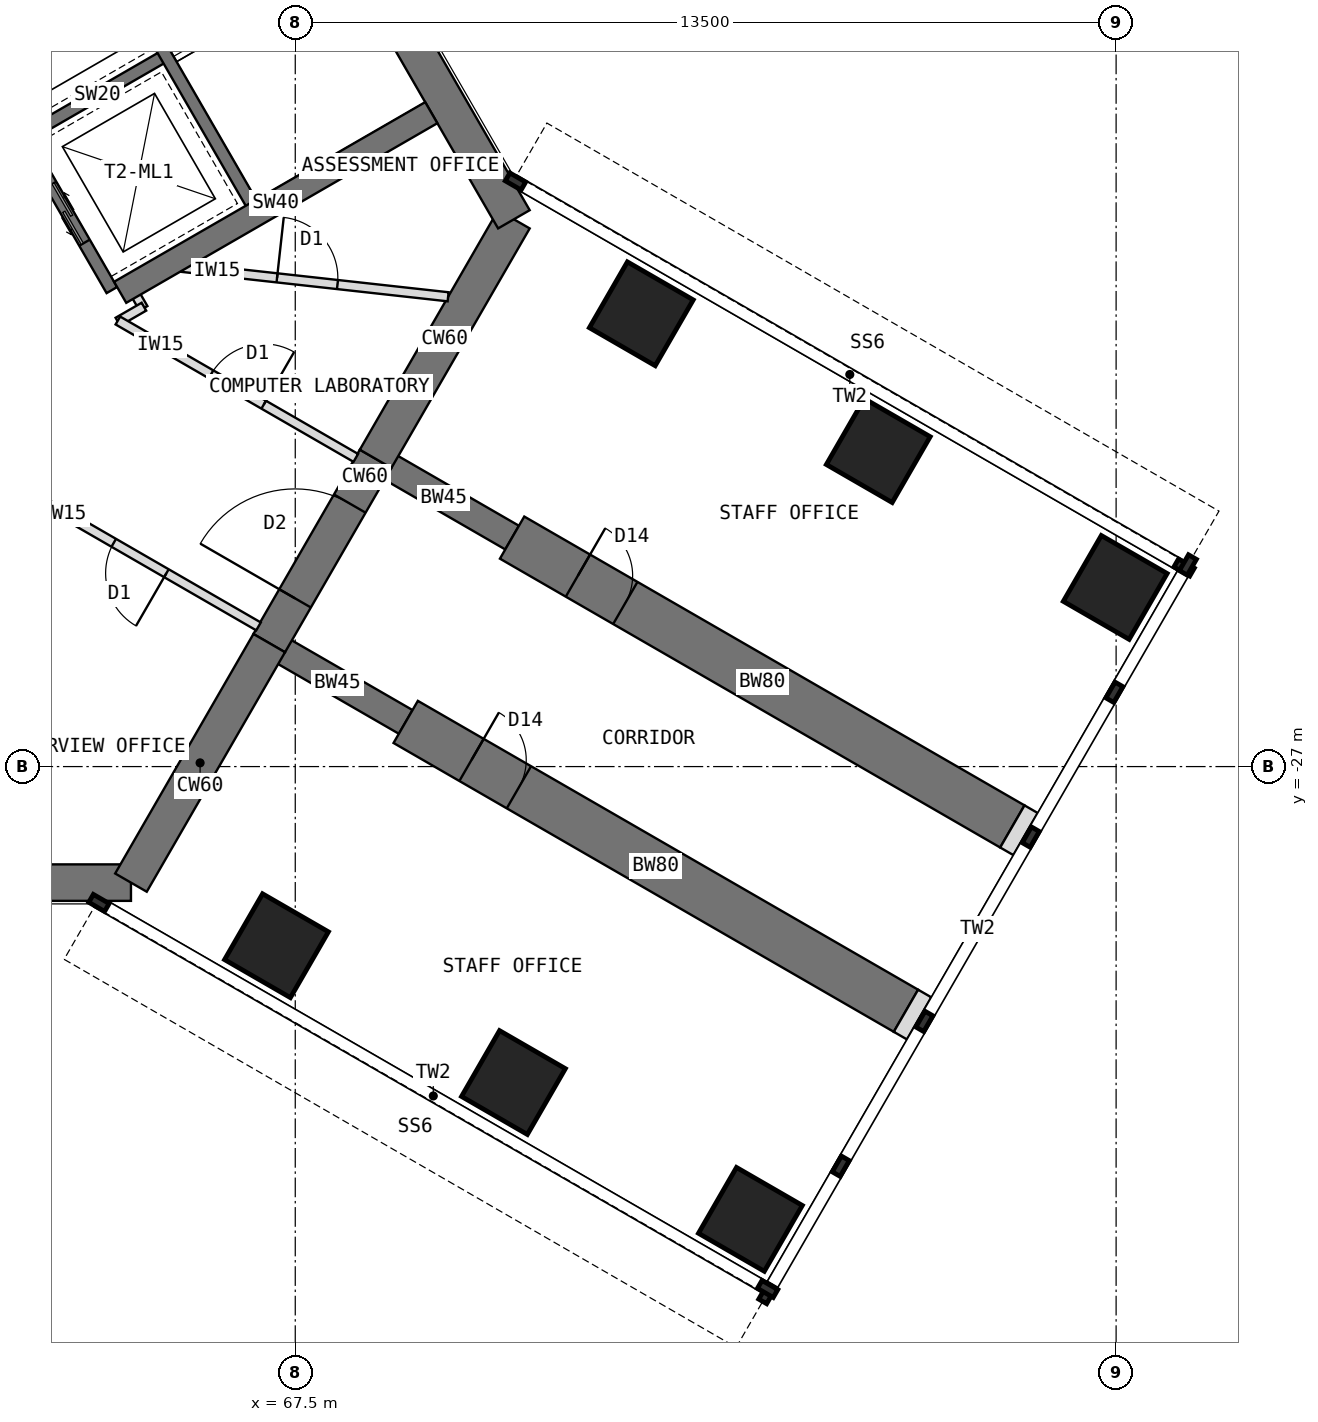
"""IFC4 building model, lengths in metres.
Left out: names, types, materials, properties, quantities, classifications, styles, units other than length and angle.
Written with IfcOpenShell. Run it as: python <this file> out.ifc"""

import sys

from ifc_helpers import new_model, si_unit, direction, frame, frame_2d, origin, origin_2d, place, context, subcontext, project, spatial, rectangle, extrude, element, fill, save


model = new_model("IFC4")
c1 = context("Model", 3, precision=1e-05, world=origin(), true_north=direction((0.0, 1.0)))
c2 = subcontext(c1, "Body", "Model", "MODEL_VIEW")
j1 = project(units=[si_unit("LENGTHUNIT", "METRE"), si_unit("PLANEANGLEUNIT", "RADIAN")], contexts=[c1])
p1 = place(None, origin())
s1 = spatial("IfcSite", under=j1, at=p1, CompositionType="ELEMENT")
p2 = place(p1, origin())
s2 = spatial("IfcBuilding", under=s1, at=p2, CompositionType="ELEMENT")
p3 = place(p2, frame((0.0, 0.0, 145.5)))
s3 = spatial("IfcBuildingStorey", under=s2, at=p3, CompositionType="ELEMENT", Elevation=145.5)
p4 = place(p3, frame((52.202, -28.908, 0.0), z_axis=(0.0, 0.0, 1.0), x_axis=(1.0, 0.0, 0.0)))
e1 = element("IfcWall", 1, at=p4, inside=s3, PredefinedType="SHEAR", context=c2, shape_type="SweptSolid", body=[
    extrude(rectangle(XDim=12.596, YDim=0.6, at=frame_2d((6.298, 0.0))), origin(), (0.0, 0.0, 1.0), 4.0),
])
p5 = place(p3, frame((64.798, -28.908, 0.0), z_axis=(0.0, 0.0, 1.0), x_axis=(0.499984222037, 0.866034513004, 0.0)))
e2 = element("IfcWall", 2, at=p5, inside=s3, PredefinedType="SHEAR", context=c2, shape_type="SweptSolid", body=[
    extrude(rectangle(XDim=4.548, YDim=0.6, at=frame_2d((2.274, 0.0))), origin(), (0.0, 0.0, 1.0), 4.0),
])
p6 = place(p3, frame((67.072, -24.97, 0.0), z_axis=(0.0, 0.0, 1.0), x_axis=(0.500010275428, 0.866019471182, 0.0)))
e3 = element("IfcWall", 3, at=p6, inside=s3, PredefinedType="SHEAR", context=c2, shape_type="SweptSolid", body=[
    extrude(rectangle(XDim=3.5, YDim=0.6, at=frame_2d((1.75, 0.0))), origin(), (0.0, 0.0, 1.0), 4.0),
])
p7 = place(p6, frame((0.85, 0.0, 0.0)))
e4 = element("IfcOpeningElement", 4, at=p7, cuts=e3, PredefinedType="OPENING", context=c2, shape_type="SweptSolid", body=[
    extrude(rectangle(XDim=1.8, YDim=2.1, at=frame_2d((0.9, 1.05))), frame((0.0, 0.31, 0.0), z_axis=(0.0, -1.0, 0.0), x_axis=(1.0, 0.0, 0.0)), (0.0, 0.0, 1.0), 0.62),
])
p8 = place(p3, frame((68.822, -21.939, 0.0), z_axis=(0.0, 0.0, 1.0), x_axis=(0.500024481964, 0.866011268655, 0.0)))
e5 = element("IfcWall", 5, at=p8, inside=s3, PredefinedType="SHEAR", context=c2, shape_type="SweptSolid", body=[
    extrude(rectangle(XDim=4.548, YDim=0.6, at=frame_2d((2.274, 0.0))), origin(), (0.0, 0.0, 1.0), 4.0),
])
p9 = place(p3, frame((71.096, -18.0, 0.0), z_axis=(0.0, 0.0, 1.0), x_axis=(-0.500005998175, 0.866021940709, 0.0)))
e6 = element("IfcWall", 6, at=p9, inside=s3, PredefinedType="SHEAR", context=c2, shape_type="SweptSolid", body=[
    extrude(rectangle(XDim=12.596, YDim=0.6, at=frame_2d((6.298, 0.0))), origin(), (0.0, 0.0, 1.0), 4.0),
])
p10 = place(p3, frame((68.822, -21.939, 0.0), z_axis=(0.0, 0.0, 1.0), x_axis=(0.866072649678, -0.499918158782, 0.0)))
e7 = element("IfcWall", 7, at=p10, inside=s3, PredefinedType="SHEAR", context=c2, shape_type="SweptSolid", body=[
    extrude(rectangle(XDim=2.592, YDim=0.45, at=frame_2d((1.296, 0.0))), origin(), (0.0, 0.0, 1.0), 4.0),
])
p11 = place(p3, frame((71.066, -23.234, 0.0), z_axis=(0.0, 0.0, 1.0), x_axis=(0.86602681393, -0.499997557548, 0.0)))
e8 = element("IfcWall", 8, at=p11, inside=s3, PredefinedType="SHEAR", context=c2, shape_type="SweptSolid", body=[
    extrude(rectangle(XDim=9.5, YDim=0.8, at=frame_2d((4.75, 0.0))), origin(), (0.0, 0.0, 1.0), 4.0),
])
p12 = place(p11, frame((1.25, 0.0, 0.0)))
e9 = element("IfcOpeningElement", 9, at=p12, cuts=e8, PredefinedType="OPENING", context=c2, shape_type="SweptSolid", body=[
    extrude(rectangle(XDim=0.9, YDim=2.1, at=frame_2d((0.45, 1.05))), frame((0.0, 0.41, 0.0), z_axis=(0.0, -1.0, 0.0), x_axis=(1.0, 0.0, 0.0)), (0.0, 0.0, 1.0), 0.82),
])
p13 = place(p3, frame((67.072, -24.97, 0.0), z_axis=(0.0, 0.0, 1.0), x_axis=(0.866031863473, -0.499988811324, 0.0)))
e10 = element("IfcWall", 10, at=p13, inside=s3, PredefinedType="SHEAR", context=c2, shape_type="SweptSolid", body=[
    extrude(rectangle(XDim=2.592, YDim=0.45, at=frame_2d((1.296, 0.0))), origin(), (0.0, 0.0, 1.0), 4.0),
])
p14 = place(p3, frame((69.316, -26.266, 0.0), z_axis=(0.0, 0.0, 1.0), x_axis=(0.86602681393, -0.499997557548, 0.0)))
e11 = element("IfcWall", 11, at=p14, inside=s3, PredefinedType="SHEAR", context=c2, shape_type="SweptSolid", body=[
    extrude(rectangle(XDim=9.5, YDim=0.8, at=frame_2d((4.75, 0.0))), origin(), (0.0, 0.0, 1.0), 4.0),
])
p15 = place(p14, frame((1.25, 0.0, 0.0)))
e12 = element("IfcOpeningElement", 12, at=p15, cuts=e11, PredefinedType="OPENING", context=c2, shape_type="SweptSolid", body=[
    extrude(rectangle(XDim=0.9, YDim=2.1, at=frame_2d((0.45, 1.05))), frame((0.0, 0.41, 0.0), z_axis=(0.0, -1.0, 0.0), x_axis=(1.0, 0.0, 0.0)), (0.0, 0.0, 1.0), 0.82),
])
for number, where, z_axis, x_axis in (
    (13, (73.191, -19.554, 0.0), (0.0, 0.0, 1.0), (0.5, 0.866, 0.0)),
    (14, (67.191, -29.946, 0.0), (0.0, 0.0, 1.0), (0.5, 0.866, 0.0)),
    (15, (77.088, -21.804, 0.0), (0.0, 0.0, 1.0), (0.5, 0.866, 0.0)),
    (16, (71.088, -32.196, 0.0), (0.0, 0.0, 1.0), (0.5, 0.866, 0.0)),
    (17, (80.986, -24.054, 0.0), (0.0, 0.0, 1.0), (0.5, 0.866, 0.0)),
    (18, (74.986, -34.446, 0.0), (0.0, 0.0, 1.0), (0.5, 0.866, 0.0)),
):
    element("IfcColumn", number, at=place(p3, frame(where, z_axis=z_axis, x_axis=x_axis)), inside=s3, PredefinedType="COLUMN", context=c2, shape_type="SweptSolid", body=[
        extrude(rectangle(XDim=1.25, YDim=1.25, at=origin_2d()), origin(), (0.0, 0.0, 1.0), 4.0),
    ])
for number, where, z_axis, x_axis in (
    (19, (79.294, -27.984, 0.0), (0.0, 0.0, 1.0), (0.866, -0.5, 0.0)),
    (20, (77.544, -31.016, 0.0), (0.0, 0.0, 1.0), (0.866, -0.5, 0.0)),
):
    element("IfcWall", number, at=place(p3, frame(where, z_axis=z_axis, x_axis=x_axis)), inside=s3, PredefinedType="PARTITIONING", context=c2, shape_type="SweptSolid", body=[
        extrude(rectangle(XDim=0.25, YDim=0.8, at=frame_2d((0.125, 0.0))), origin(), (0.0, 0.0, 1.0), 3.8),
    ])
p16 = place(p3, frame((64.484, -19.164, 0.0), z_axis=(0.0, 0.0, 1.0), x_axis=(-0.49999894854, 0.866026010844, 0.0)))
e21 = element("IfcWall", 21, at=p16, inside=s3, PredefinedType="SHEAR", context=c2, shape_type="SweptSolid", body=[
    extrude(rectangle(XDim=8.0, YDim=0.2, at=frame_2d((4.0, 0.0))), origin(), (0.0, 0.0, 1.0), 4.0),
])
p17 = place(p16, frame((6.3, 0.0, 0.0)))
e22 = element("IfcOpeningElement", 22, at=p17, cuts=e21, PredefinedType="OPENING", context=c2, shape_type="SweptSolid", body=[
    extrude(rectangle(XDim=1.2, YDim=2.1, at=frame_2d((0.6, 1.05))), frame((0.0, 0.11, 0.0), z_axis=(0.0, -1.0, 0.0), x_axis=(1.0, 0.0, 0.0)), (0.0, 0.0, 1.0), 0.22),
])
p18 = place(p16, frame((0.9, 0.0, 0.0)))
e23 = element("IfcOpeningElement", 23, at=p18, cuts=e21, PredefinedType="OPENING", context=c2, shape_type="SweptSolid", body=[
    extrude(rectangle(XDim=1.1, YDim=2.2, at=frame_2d((0.55, 1.1))), frame((0.0, 0.11, 0.0), z_axis=(0.0, -1.0, 0.0), x_axis=(1.0, 0.0, 0.0)), (0.0, 0.0, 1.0), 0.22),
])
p19 = place(p16, frame((3.8, 0.0, 0.0)))
e24 = element("IfcOpeningElement", 24, at=p19, cuts=e21, PredefinedType="OPENING", context=c2, shape_type="SweptSolid", body=[
    extrude(rectangle(XDim=1.1, YDim=2.2, at=frame_2d((0.55, 1.1))), frame((0.0, 0.11, 0.0), z_axis=(0.0, -1.0, 0.0), x_axis=(1.0, 0.0, 0.0)), (0.0, 0.0, 1.0), 0.22),
])
p20 = place(p3, frame((63.12, -16.603, 0.0), z_axis=(0.0, 0.0, 1.0), x_axis=(0.866062058628, 0.499936506574, 0.0)))
e25 = element("IfcWall", 25, at=p20, inside=s3, PredefinedType="SHEAR", context=c2, shape_type="SweptSolid", body=[
    extrude(rectangle(XDim=2.6, YDim=0.2, at=frame_2d((1.3, 0.0))), origin(), (0.0, 0.0, 1.0), 4.0),
])
p21 = place(p3, frame((66.822, -17.814, 0.0), z_axis=(0.0, 0.0, 1.0), x_axis=(-0.49999894854, 0.866026010844, 0.0)))
e26 = element("IfcWall", 26, at=p21, inside=s3, PredefinedType="SHEAR", context=c2, shape_type="SweptSolid", body=[
    extrude(rectangle(XDim=8.0, YDim=0.2, at=frame_2d((4.0, 0.0))), origin(), (0.0, 0.0, 1.0), 4.0),
])
p22 = place(p21, frame((6.7, 0.0, 0.0)))
e27 = element("IfcOpeningElement", 27, at=p22, cuts=e26, PredefinedType="OPENING", context=c2, shape_type="SweptSolid", body=[
    extrude(rectangle(XDim=1.1, YDim=2.1, at=frame_2d((0.55, 1.05))), frame((0.0, 0.11, 0.0), z_axis=(0.0, -1.0, 0.0), x_axis=(1.0, 0.0, 0.0)), (0.0, 0.0, 1.0), 0.22),
])
p23 = place(p3, frame((64.62, -19.201, 0.0), z_axis=(0.0, 0.0, 1.0), x_axis=(0.866027317282, 0.49999668571, 0.0)))
e28 = element("IfcWall", 28, at=p23, inside=s3, PredefinedType="SHEAR", context=c2, shape_type="SweptSolid", body=[
    extrude(rectangle(XDim=5.908, YDim=0.4, at=frame_2d((2.954, 0.0))), origin(), (0.0, 0.0, 1.0), 4.0),
])
p24 = place(p3, frame((64.789, -19.092, 0.0), z_axis=(0.0, 0.0, 1.0), x_axis=(0.499804398801, -0.866138304741, 0.0)))
e29 = element("IfcWall", 29, at=p24, inside=s3, PredefinedType="PARTITIONING", context=c2, shape_type="SweptSolid", body=[
    extrude(rectangle(XDim=0.43, YDim=0.15, at=frame_2d((0.215, 0.0))), origin(), (0.0, 0.0, 1.0), 3.8),
])
p25 = place(p3, frame((65.011, -19.437, 0.0), z_axis=(0.0, 0.0, 1.0), x_axis=(-0.865831790172, -0.50033519877, 0.0)))
e30 = element("IfcWall", 30, at=p25, inside=s3, PredefinedType="PARTITIONING", context=c2, shape_type="SweptSolid", body=[
    extrude(rectangle(XDim=0.494, YDim=0.15, at=frame_2d((0.247, 0.0))), origin(), (0.0, 0.0, 1.0), 3.8),
])
p26 = place(p3, frame((64.583, -19.664, 0.0), z_axis=(0.0, 0.0, 1.0), x_axis=(0.866006515865, -0.500032713409, 0.0)))
e31 = element("IfcWall", 31, at=p26, inside=s3, PredefinedType="PARTITIONING", context=c2, shape_type="SweptSolid", body=[
    extrude(rectangle(XDim=4.518, YDim=0.15, at=frame_2d((2.259, 0.0))), origin(), (0.0, 0.0, 1.0), 3.8),
])
p27 = place(p26, frame((1.769, 0.0, 0.0)))
e32 = element("IfcOpeningElement", 32, at=p27, cuts=e31, PredefinedType="OPENING", context=c2, shape_type="SweptSolid", body=[
    extrude(rectangle(XDim=1.0, YDim=2.1, at=frame_2d((0.5, 1.05))), frame((0.0, 0.085, 0.0), z_axis=(0.0, -1.0, 0.0), x_axis=(1.0, 0.0, 0.0)), (0.0, 0.0, 1.0), 0.17),
])
p28 = place(p3, frame((66.896, -24.695, 0.0), z_axis=(0.0, 0.0, 1.0), x_axis=(-0.86602002524, 0.500009315796, 0.0)))
e33 = element("IfcWall", 33, at=p28, inside=s3, PredefinedType="PARTITIONING", context=c2, shape_type="SweptSolid", body=[
    extrude(rectangle(XDim=4.519, YDim=0.15, at=frame_2d((2.259, 0.0))), origin(), (0.0, 0.0, 1.0), 3.8),
])
p29 = place(p28, frame((1.749, 0.0, 0.0)))
e34 = element("IfcOpeningElement", 34, at=p29, cuts=e33, PredefinedType="OPENING", context=c2, shape_type="SweptSolid", body=[
    extrude(rectangle(XDim=1.0, YDim=2.1, at=frame_2d((0.5, 1.05))), frame((0.0, 0.085, 0.0), z_axis=(0.0, -1.0, 0.0), x_axis=(1.0, 0.0, 0.0)), (0.0, 0.0, 1.0), 0.17),
])
p30 = place(p3, frame((65.381, -18.761, 0.0), z_axis=(0.0, 0.0, 1.0), x_axis=(0.993932184458, -0.109994603044, 0.0)))
e35 = element("IfcWall", 35, at=p30, inside=s3, PredefinedType="PARTITIONING", context=c2, shape_type="SweptSolid", body=[
    extrude(rectangle(XDim=4.661, YDim=0.15, at=frame_2d((2.331, 0.0))), origin(), (0.0, 0.0, 1.0), 3.8),
])
p31 = place(p30, frame((1.831, 0.0, 0.0)))
e36 = element("IfcOpeningElement", 36, at=p31, cuts=e35, PredefinedType="OPENING", context=c2, shape_type="SweptSolid", body=[
    extrude(rectangle(XDim=1.0, YDim=2.1, at=frame_2d((0.5, 1.05))), frame((0.0, 0.085, 0.0), z_axis=(0.0, -1.0, 0.0), x_axis=(1.0, 0.0, 0.0)), (0.0, 0.0, 1.0), 0.17),
])
p32 = place(p18, origin())
e37 = element("IfcDoor", 37, at=p32, inside=s3, OperationType="DOUBLE_DOOR_SLIDING", PredefinedType="DOOR", context=c2, shape_type="SweptSolid", body=[
    extrude(rectangle(XDim=1.1, YDim=2.2, at=frame_2d((0.55, 1.1))), frame((0.0, 0.025, 0.0), z_axis=(0.0, -1.0, 0.0), x_axis=(1.0, 0.0, 0.0)), (0.0, 0.0, 1.0), 0.05),
])
fill(e23, e37)
p33 = place(p7, origin())
e38 = element("IfcDoor", 38, at=p33, inside=s3, OperationType="DOUBLE_DOOR_DOUBLE_SWING", PredefinedType="DOOR", context=c2, shape_type="SweptSolid", body=[
    extrude(rectangle(XDim=1.72, YDim=2.06, at=frame_2d((0.9, 1.03))), frame((0.0, 0.025, 0.0), z_axis=(0.0, -1.0, 0.0), x_axis=(1.0, 0.0, 0.0)), (0.0, 0.0, 1.0), 0.05),
    extrude(rectangle(XDim=0.04, YDim=2.1, at=frame_2d((0.02, 1.05))), frame((0.0, 0.3, 0.0), z_axis=(0.0, -1.0, 0.0), x_axis=(1.0, 0.0, 0.0)), (0.0, 0.0, 1.0), 0.6),
    extrude(rectangle(XDim=0.04, YDim=2.1, at=frame_2d((1.78, 1.05))), frame((0.0, 0.3, 0.0), z_axis=(0.0, -1.0, 0.0), x_axis=(1.0, 0.0, 0.0)), (0.0, 0.0, 1.0), 0.6),
    extrude(rectangle(XDim=1.72, YDim=0.04, at=frame_2d((0.9, 2.08))), frame((0.0, 0.3, 0.0), z_axis=(0.0, -1.0, 0.0), x_axis=(1.0, 0.0, 0.0)), (0.0, 0.0, 1.0), 0.6),
])
fill(e4, e38)
p34 = place(p29, origin())
e39 = element("IfcDoor", 39, at=p34, inside=s3, OperationType="SINGLE_SWING_LEFT", PredefinedType="DOOR", context=c2, shape_type="SweptSolid", body=[
    extrude(rectangle(XDim=1.0, YDim=2.1, at=frame_2d((0.5, 1.05))), frame((0.0, 0.025, 0.0), z_axis=(0.0, -1.0, 0.0), x_axis=(1.0, 0.0, 0.0)), (0.0, 0.0, 1.0), 0.05),
])
fill(e34, e39)
p35 = place(p27, origin())
e40 = element("IfcDoor", 40, at=p35, inside=s3, OperationType="SINGLE_SWING_RIGHT", PredefinedType="DOOR", context=c2, shape_type="SweptSolid", body=[
    extrude(rectangle(XDim=1.0, YDim=2.1, at=frame_2d((0.5, 1.05))), frame((0.0, 0.025, 0.0), z_axis=(0.0, -1.0, 0.0), x_axis=(1.0, 0.0, 0.0)), (0.0, 0.0, 1.0), 0.05),
])
fill(e32, e40)
p36 = place(p31, origin())
e41 = element("IfcDoor", 41, at=p36, inside=s3, OperationType="SINGLE_SWING_LEFT", PredefinedType="DOOR", context=c2, shape_type="SweptSolid", body=[
    extrude(rectangle(XDim=1.0, YDim=2.1, at=frame_2d((0.5, 1.05))), frame((0.0, 0.025, 0.0), z_axis=(0.0, -1.0, 0.0), x_axis=(1.0, 0.0, 0.0)), (0.0, 0.0, 1.0), 0.05),
])
fill(e36, e41)
p37 = place(p12, origin())
e42 = element("IfcDoor", 42, at=p37, inside=s3, OperationType="SINGLE_SWING_LEFT", PredefinedType="DOOR", context=c2, shape_type="SweptSolid", body=[
    extrude(rectangle(XDim=0.82, YDim=2.06, at=frame_2d((0.45, 1.03))), frame((0.0, 0.025, 0.0), z_axis=(0.0, -1.0, 0.0), x_axis=(1.0, 0.0, 0.0)), (0.0, 0.0, 1.0), 0.05),
    extrude(rectangle(XDim=0.04, YDim=2.1, at=frame_2d((0.02, 1.05))), frame((0.0, 0.4, 0.0), z_axis=(0.0, -1.0, 0.0), x_axis=(1.0, 0.0, 0.0)), (0.0, 0.0, 1.0), 0.8),
    extrude(rectangle(XDim=0.04, YDim=2.1, at=frame_2d((0.88, 1.05))), frame((0.0, 0.4, 0.0), z_axis=(0.0, -1.0, 0.0), x_axis=(1.0, 0.0, 0.0)), (0.0, 0.0, 1.0), 0.8),
    extrude(rectangle(XDim=0.82, YDim=0.04, at=frame_2d((0.45, 2.08))), frame((0.0, 0.4, 0.0), z_axis=(0.0, -1.0, 0.0), x_axis=(1.0, 0.0, 0.0)), (0.0, 0.0, 1.0), 0.8),
])
fill(e9, e42)
p38 = place(p15, origin())
e43 = element("IfcDoor", 43, at=p38, inside=s3, OperationType="SINGLE_SWING_LEFT", PredefinedType="DOOR", context=c2, shape_type="SweptSolid", body=[
    extrude(rectangle(XDim=0.82, YDim=2.06, at=frame_2d((0.45, 1.03))), frame((0.0, 0.025, 0.0), z_axis=(0.0, -1.0, 0.0), x_axis=(1.0, 0.0, 0.0)), (0.0, 0.0, 1.0), 0.05),
    extrude(rectangle(XDim=0.04, YDim=2.1, at=frame_2d((0.02, 1.05))), frame((0.0, 0.4, 0.0), z_axis=(0.0, -1.0, 0.0), x_axis=(1.0, 0.0, 0.0)), (0.0, 0.0, 1.0), 0.8),
    extrude(rectangle(XDim=0.04, YDim=2.1, at=frame_2d((0.88, 1.05))), frame((0.0, 0.4, 0.0), z_axis=(0.0, -1.0, 0.0), x_axis=(1.0, 0.0, 0.0)), (0.0, 0.0, 1.0), 0.8),
    extrude(rectangle(XDim=0.82, YDim=0.04, at=frame_2d((0.45, 2.08))), frame((0.0, 0.4, 0.0), z_axis=(0.0, -1.0, 0.0), x_axis=(1.0, 0.0, 0.0)), (0.0, 0.0, 1.0), 0.8),
])
fill(e12, e43)
save(model, sys.argv[1])
